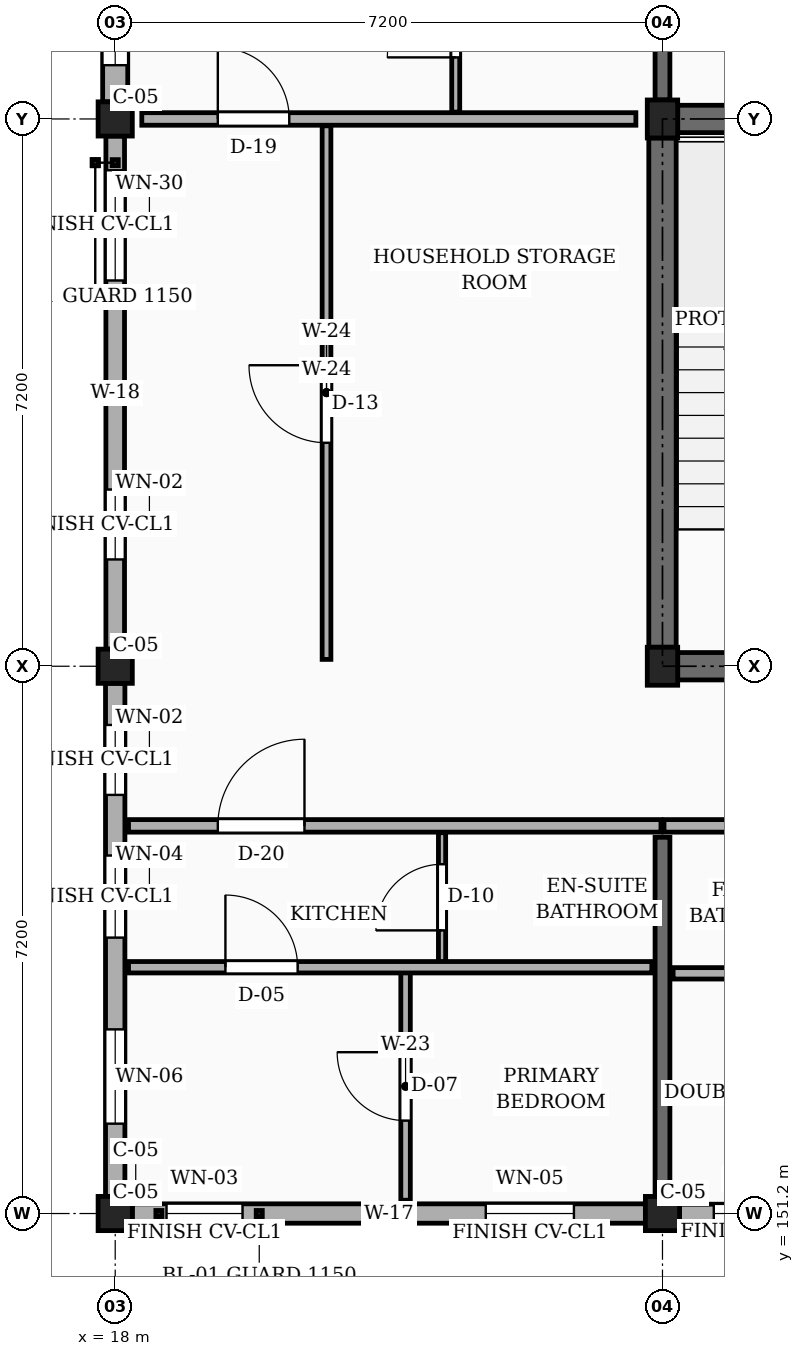
"""IFC4 building model, lengths in metres.
Left out: names, types, materials, properties, quantities, classifications, styles, units other than length and angle.
Written with IfcOpenShell. Run it as: python <this file> out.ifc"""

import sys

from ifc_helpers import new_model, si_unit, direction, frame, frame_2d, origin, origin_2d, place, context, subcontext, project, spatial, rectangle, extrude, element, fill, save


model = new_model("IFC4")
c1 = context("Model", 3, precision=1e-05, world=origin(), true_north=direction((0.0, 1.0)))
c2 = subcontext(c1, "Body", "Model", "MODEL_VIEW")
j1 = project(units=[si_unit("LENGTHUNIT", "METRE"), si_unit("PLANEANGLEUNIT", "RADIAN")], contexts=[c1])
p1 = place(None, origin())
s1 = spatial("IfcSite", under=j1, at=p1, CompositionType="ELEMENT")
p2 = place(p1, origin())
s2 = spatial("IfcBuilding", under=s1, at=p2, CompositionType="ELEMENT")
p3 = place(p2, frame((0.0, 0.0, 39.15)))
s3 = spatial("IfcBuildingStorey", under=s2, at=p3, CompositionType="ELEMENT", Elevation=39.15)
for number, where, z_axis, x_axis in (
    (1, (18.0, 151.2, 0.0), (0.0, 0.0, 1.0), (1.0, 0.0, 0.0)),
    (2, (18.0, 158.4, 0.0), (0.0, 0.0, 1.0), (1.0, 0.0, 0.0)),
    (3, (18.0, 165.6, 0.0), (0.0, 0.0, 1.0), (1.0, 0.0, 0.0)),
    (4, (25.2, 151.2, 0.0), (0.0, 0.0, 1.0), (1.0, 0.0, 0.0)),
):
    element("IfcColumn", number, at=place(p3, frame(where, z_axis=z_axis, x_axis=x_axis)), inside=s3, PredefinedType="COLUMN", context=c2, shape_type="SweptSolid", body=[
        extrude(rectangle(XDim=0.45, YDim=0.45, at=origin_2d()), origin(), (0.0, 0.0, 1.0), 3.15),
    ])
for number, where, z_axis, x_axis in (
    (5, (25.2, 158.4, 0.0), (0.0, 0.0, 1.0), (1.0, 0.0, 0.0)),
    (6, (25.2, 165.6, 0.0), (0.0, 0.0, 1.0), (1.0, 0.0, 0.0)),
):
    element("IfcColumn", number, at=place(p3, frame(where, z_axis=z_axis, x_axis=x_axis)), inside=s3, PredefinedType="COLUMN", context=c2, shape_type="SweptSolid", body=[
        extrude(rectangle(XDim=0.4, YDim=0.5, at=origin_2d()), origin(), (0.0, 0.0, 1.0), 3.15),
    ])
p4 = place(p3, frame((25.2, 151.425, 0.0), z_axis=(0.0, 0.0, 1.0), x_axis=(0.0, 1.0, 0.0)))
e7 = element("IfcWall", 7, at=p4, inside=s3, PredefinedType="SOLIDWALL", context=c2, shape_type="SweptSolid", body=[
    extrude(rectangle(XDim=4.725, YDim=0.195, at=frame_2d((2.362, 0.0))), origin(), (0.0, 0.0, 1.0), 2.185),
])
p5 = place(p3, frame((25.2, 165.85, 0.0), z_axis=(0.0, 0.0, 1.0), x_axis=(0.0, 1.0, 0.0)))
e8 = element("IfcWall", 8, at=p5, inside=s3, PredefinedType="SOLIDWALL", context=c2, shape_type="SweptSolid", body=[
    extrude(rectangle(XDim=6.725, YDim=0.195, at=frame_2d((3.362, 0.0))), origin(), (0.0, 0.0, 1.0), 2.185),
])
p6 = place(p5, frame((4.15, 0.0, 0.0)))
e9 = element("IfcOpeningElement", 9, at=p6, cuts=e8, PredefinedType="OPENING", context=c2, shape_type="SweptSolid", body=[
    extrude(rectangle(XDim=0.98, YDim=2.12, at=frame_2d((0.49, 1.06))), frame((0.0, 0.107, 0.0), z_axis=(0.0, -1.0, 0.0), x_axis=(1.0, 0.0, 0.0)), (0.0, 0.0, 1.0), 0.215),
])
p7 = place(p3, frame((18.225, 151.2, 0.0), z_axis=(0.0, 0.0, 1.0), x_axis=(1.0, 0.0, 0.0)))
e10 = element("IfcWall", 10, at=p7, inside=s3, PredefinedType="SOLIDWALL", context=c2, shape_type="SweptSolid", body=[
    extrude(rectangle(XDim=6.75, YDim=0.255, at=frame_2d((3.375, 0.0))), origin(), (0.0, 0.0, 1.0), 2.455),
])
p8 = place(p7, frame((0.45, 0.0, 0.78)))
e11 = element("IfcOpeningElement", 11, at=p8, cuts=e10, PredefinedType="OPENING", context=c2, shape_type="SweptSolid", body=[
    extrude(rectangle(XDim=1.0, YDim=1.15, at=frame_2d((0.5, 0.575))), frame((0.0, 0.137, 0.0), z_axis=(0.0, -1.0, 0.0), x_axis=(1.0, 0.0, 0.0)), (0.0, 0.0, 1.0), 0.275),
])
p9 = place(p7, frame((4.65, 0.0, 0.78)))
e12 = element("IfcOpeningElement", 12, at=p9, cuts=e10, PredefinedType="OPENING", context=c2, shape_type="SweptSolid", body=[
    extrude(rectangle(XDim=1.16, YDim=1.15, at=frame_2d((0.58, 0.575))), frame((0.0, 0.137, 0.0), z_axis=(0.0, -1.0, 0.0), x_axis=(1.0, 0.0, 0.0)), (0.0, 0.0, 1.0), 0.275),
])
p10 = place(p3, frame((25.425, 151.2, 0.0), z_axis=(0.0, 0.0, 1.0), x_axis=(1.0, 0.0, 0.0)))
e13 = element("IfcWall", 13, at=p10, inside=s3, PredefinedType="SOLIDWALL", context=c2, shape_type="SweptSolid", body=[
    extrude(rectangle(XDim=6.75, YDim=0.245, at=frame_2d((3.375, 0.0))), origin(), (0.0, 0.0, 1.0), 2.455),
])
p11 = place(p10, frame((0.45, 0.0, 0.78)))
e14 = element("IfcOpeningElement", 14, at=p11, cuts=e13, PredefinedType="OPENING", context=c2, shape_type="SweptSolid", body=[
    extrude(rectangle(XDim=1.16, YDim=1.15, at=frame_2d((0.58, 0.575))), frame((0.0, 0.133, 0.0), z_axis=(0.0, -1.0, 0.0), x_axis=(1.0, 0.0, 0.0)), (0.0, 0.0, 1.0), 0.265),
])
p12 = place(p10, frame((4.65, 0.0, 0.78)))
e15 = element("IfcOpeningElement", 15, at=p12, cuts=e13, PredefinedType="OPENING", context=c2, shape_type="SweptSolid", body=[
    extrude(rectangle(XDim=1.32, YDim=1.15, at=frame_2d((0.66, 0.575))), frame((0.0, 0.133, 0.0), z_axis=(0.0, -1.0, 0.0), x_axis=(1.0, 0.0, 0.0)), (0.0, 0.0, 1.0), 0.265),
])
p13 = place(p3, frame((18.0, 172.575, 0.0), z_axis=(0.0, 0.0, 1.0), x_axis=(0.0, -1.0, 0.0)))
e16 = element("IfcWall", 16, at=p13, inside=s3, PredefinedType="SOLIDWALL", context=c2, shape_type="SweptSolid", body=[
    extrude(rectangle(XDim=6.75, YDim=0.33, at=frame_2d((3.375, 0.0))), origin(), (0.0, 0.0, 1.0), 2.455),
])
p14 = place(p13, frame((1.683, 0.0, 0.78)))
e17 = element("IfcOpeningElement", 17, at=p14, cuts=e16, PredefinedType="OPENING", context=c2, shape_type="SweptSolid", body=[
    extrude(rectangle(XDim=1.25, YDim=1.44, at=frame_2d((0.625, 0.72))), frame((0.0, 0.175, 0.0), z_axis=(0.0, -1.0, 0.0), x_axis=(1.0, 0.0, 0.0)), (0.0, 0.0, 1.0), 0.35),
])
p15 = place(p13, frame((4.817, 0.0, 0.78)))
e18 = element("IfcOpeningElement", 18, at=p15, cuts=e16, PredefinedType="OPENING", context=c2, shape_type="SweptSolid", body=[
    extrude(rectangle(XDim=1.45, YDim=1.44, at=frame_2d((0.725, 0.72))), frame((0.0, 0.175, 0.0), z_axis=(0.0, -1.0, 0.0), x_axis=(1.0, 0.0, 0.0)), (0.0, 0.0, 1.0), 0.35),
])
p16 = place(p3, frame((18.0, 165.375, 0.0), z_axis=(0.0, 0.0, 1.0), x_axis=(0.0, -1.0, 0.0)))
e19 = element("IfcWall", 19, at=p16, inside=s3, PredefinedType="SOLIDWALL", context=c2, shape_type="SweptSolid", body=[
    extrude(rectangle(XDim=6.75, YDim=0.245, at=frame_2d((3.375, 0.0))), origin(), (0.0, 0.0, 1.0), 2.455),
])
p17 = place(p16, frame((0.45, 0.0, 0.78)))
e20 = element("IfcOpeningElement", 20, at=p17, cuts=e19, PredefinedType="OPENING", context=c2, shape_type="SweptSolid", body=[
    extrude(rectangle(XDim=1.45, YDim=1.44, at=frame_2d((0.725, 0.72))), frame((0.0, 0.133, 0.0), z_axis=(0.0, -1.0, 0.0), x_axis=(1.0, 0.0, 0.0)), (0.0, 0.0, 1.0), 0.265),
])
p18 = place(p16, frame((4.65, 0.0, 0.78)))
e21 = element("IfcOpeningElement", 21, at=p18, cuts=e19, PredefinedType="OPENING", context=c2, shape_type="SweptSolid", body=[
    extrude(rectangle(XDim=0.92, YDim=1.15, at=frame_2d((0.46, 0.575))), frame((0.0, 0.133, 0.0), z_axis=(0.0, -1.0, 0.0), x_axis=(1.0, 0.0, 0.0)), (0.0, 0.0, 1.0), 0.265),
])
p19 = place(p3, frame((18.0, 158.175, 0.0), z_axis=(0.0, 0.0, 1.0), x_axis=(0.0, -1.0, 0.0)))
e22 = element("IfcWall", 22, at=p19, inside=s3, PredefinedType="SOLIDWALL", context=c2, shape_type="SweptSolid", body=[
    extrude(rectangle(XDim=6.75, YDim=0.255, at=frame_2d((3.375, 0.0))), origin(), (0.0, 0.0, 1.0), 2.455),
])
p20 = place(p19, frame((0.548, 0.0, 0.78)))
e23 = element("IfcOpeningElement", 23, at=p20, cuts=e22, PredefinedType="OPENING", context=c2, shape_type="SweptSolid", body=[
    extrude(rectangle(XDim=0.92, YDim=1.15, at=frame_2d((0.46, 0.575))), frame((0.0, 0.137, 0.0), z_axis=(0.0, -1.0, 0.0), x_axis=(1.0, 0.0, 0.0)), (0.0, 0.0, 1.0), 0.275),
])
p21 = place(p19, frame((2.265, 0.0, 0.78)))
e24 = element("IfcOpeningElement", 24, at=p21, cuts=e22, PredefinedType="OPENING", context=c2, shape_type="SweptSolid", body=[
    extrude(rectangle(XDim=1.08, YDim=1.15, at=frame_2d((0.54, 0.575))), frame((0.0, 0.137, 0.0), z_axis=(0.0, -1.0, 0.0), x_axis=(1.0, 0.0, 0.0)), (0.0, 0.0, 1.0), 0.275),
])
p22 = place(p19, frame((4.552, 0.0, 0.78)))
e25 = element("IfcOpeningElement", 25, at=p22, cuts=e22, PredefinedType="OPENING", context=c2, shape_type="SweptSolid", body=[
    extrude(rectangle(XDim=1.24, YDim=1.15, at=frame_2d((0.62, 0.575))), frame((0.0, 0.137, 0.0), z_axis=(0.0, -1.0, 0.0), x_axis=(1.0, 0.0, 0.0)), (0.0, 0.0, 1.0), 0.275),
])
p23 = place(p3, frame((25.2, 158.65, 0.0), z_axis=(0.0, 0.0, 1.0), x_axis=(0.0, 1.0, 0.0)))
e26 = element("IfcWall", 26, at=p23, inside=s3, PredefinedType="SHEAR", context=c2, shape_type="SweptSolid", body=[
    extrude(rectangle(XDim=6.7, YDim=0.36, at=frame_2d((3.35, 0.0))), origin(), (0.0, 0.0, 1.0), 2.885),
])
p24 = place(p3, frame((25.4, 165.6, 0.0), z_axis=(0.0, 0.0, 1.0), x_axis=(1.0, 0.0, 0.0)))
e27 = element("IfcWall", 27, at=p24, inside=s3, PredefinedType="SHEAR", context=c2, shape_type="SweptSolid", body=[
    extrude(rectangle(XDim=6.8, YDim=0.36, at=frame_2d((3.4, 0.0))), origin(), (0.0, 0.0, 1.0), 2.885),
])
p25 = place(p3, frame((25.4, 158.4, 0.0), z_axis=(0.0, 0.0, 1.0), x_axis=(1.0, 0.0, 0.0)))
e28 = element("IfcWall", 28, at=p25, inside=s3, PredefinedType="SHEAR", context=c2, shape_type="SweptSolid", body=[
    extrude(rectangle(XDim=6.8, YDim=0.36, at=frame_2d((3.4, 0.0))), origin(), (0.0, 0.0, 1.0), 2.885),
])
p26 = place(p25, frame((4.55, 0.0, 0.0)))
e29 = element("IfcOpeningElement", 29, at=p26, cuts=e28, PredefinedType="OPENING", context=c2, shape_type="SweptSolid", body=[
    extrude(rectangle(XDim=1.1, YDim=2.15, at=frame_2d((0.55, 1.075))), frame((0.0, 0.19, 0.0), z_axis=(0.0, -1.0, 0.0), x_axis=(1.0, 0.0, 0.0)), (0.0, 0.0, 1.0), 0.38),
])
p27 = place(p3, frame((18.175, 156.3, 0.0), z_axis=(0.0, 0.0, 1.0), x_axis=(1.0, 0.0, 0.0)))
e30 = element("IfcWall", 30, at=p27, inside=s3, PredefinedType="PARTITIONING", context=c2, shape_type="SweptSolid", body=[
    extrude(rectangle(XDim=7.005, YDim=0.165, at=frame_2d((3.502, 0.0))), origin(), (0.0, 0.0, 1.0), 2.32),
])
p28 = place(p27, frame((1.175, 0.0, 0.0)))
e31 = element("IfcOpeningElement", 31, at=p28, cuts=e30, PredefinedType="OPENING", context=c2, shape_type="SweptSolid", body=[
    extrude(rectangle(XDim=1.14, YDim=2.18, at=frame_2d((0.57, 1.09))), frame((0.0, 0.093, 0.0), z_axis=(0.0, -1.0, 0.0), x_axis=(1.0, 0.0, 0.0)), (0.0, 0.0, 1.0), 0.185),
])
p29 = place(p3, frame((25.22, 156.3, 0.0), z_axis=(0.0, 0.0, 1.0), x_axis=(1.0, 0.0, 0.0)))
e32 = element("IfcWall", 32, at=p29, inside=s3, PredefinedType="PARTITIONING", context=c2, shape_type="SweptSolid", body=[
    extrude(rectangle(XDim=7.16, YDim=0.165, at=frame_2d((3.58, 0.0))), origin(), (0.0, 0.0, 1.0), 2.32),
])
p30 = place(p29, frame((4.78, 0.0, 0.0)))
e33 = element("IfcOpeningElement", 33, at=p30, cuts=e32, PredefinedType="OPENING", context=c2, shape_type="SweptSolid", body=[
    extrude(rectangle(XDim=1.0, YDim=2.15, at=frame_2d((0.5, 1.075))), frame((0.0, 0.093, 0.0), z_axis=(0.0, -1.0, 0.0), x_axis=(1.0, 0.0, 0.0)), (0.0, 0.0, 1.0), 0.185),
])
p31 = place(p3, frame((18.35, 165.6, 0.0), z_axis=(0.0, 0.0, 1.0), x_axis=(1.0, 0.0, 0.0)))
e34 = element("IfcWall", 34, at=p31, inside=s3, PredefinedType="PARTITIONING", context=c2, shape_type="SweptSolid", body=[
    extrude(rectangle(XDim=6.5, YDim=0.165, at=frame_2d((3.25, 0.0))), origin(), (0.0, 0.0, 1.0), 2.32),
])
p32 = place(p31, frame((1.0, 0.0, 0.0)))
e35 = element("IfcOpeningElement", 35, at=p32, cuts=e34, PredefinedType="OPENING", context=c2, shape_type="SweptSolid", body=[
    extrude(rectangle(XDim=0.94, YDim=2.12, at=frame_2d((0.47, 1.06))), frame((0.0, 0.093, 0.0), z_axis=(0.0, -1.0, 0.0), x_axis=(1.0, 0.0, 0.0)), (0.0, 0.0, 1.0), 0.185),
])
p33 = place(p3, frame((20.78, 158.49, 0.0), z_axis=(0.0, 0.0, 1.0), x_axis=(0.0, 1.0, 0.0)))
e36 = element("IfcWall", 36, at=p33, inside=s3, PredefinedType="PARTITIONING", context=c2, shape_type="SweptSolid", body=[
    extrude(rectangle(XDim=7.02, YDim=0.115, at=frame_2d((3.51, 0.0))), origin(), (0.0, 0.0, 1.0), 2.32),
])
p34 = place(p33, frame((2.85, 0.0, 0.0)))
e37 = element("IfcOpeningElement", 37, at=p34, cuts=e36, PredefinedType="OPENING", context=c2, shape_type="SweptSolid", body=[
    extrude(rectangle(XDim=1.02, YDim=2.15, at=frame_2d((0.51, 1.075))), frame((0.0, 0.067, 0.0), z_axis=(0.0, -1.0, 0.0), x_axis=(1.0, 0.0, 0.0)), (0.0, 0.0, 1.0), 0.135),
])
p35 = place(p3, frame((21.82, 151.375, 0.0), z_axis=(0.0, 0.0, 1.0), x_axis=(0.0, 1.0, 0.0)))
e38 = element("IfcWall", 38, at=p35, inside=s3, PredefinedType="PARTITIONING", context=c2, shape_type="SweptSolid", body=[
    extrude(rectangle(XDim=2.995, YDim=0.125, at=frame_2d((1.498, 0.0))), origin(), (0.0, 0.0, 1.0), 2.32),
])
p36 = place(p35, frame((1.048, 0.0, 0.0)))
e39 = element("IfcOpeningElement", 39, at=p36, cuts=e38, PredefinedType="OPENING", context=c2, shape_type="SweptSolid", body=[
    extrude(rectangle(XDim=0.9, YDim=2.1, at=frame_2d((0.45, 1.05))), frame((0.0, 0.073, 0.0), z_axis=(0.0, -1.0, 0.0), x_axis=(1.0, 0.0, 0.0)), (0.0, 0.0, 1.0), 0.145),
])
p37 = place(p3, frame((22.3, 154.51, 0.0), z_axis=(0.0, 0.0, 1.0), x_axis=(0.0, 1.0, 0.0)))
e40 = element("IfcWall", 40, at=p37, inside=s3, PredefinedType="PARTITIONING", context=c2, shape_type="SweptSolid", body=[
    extrude(rectangle(XDim=1.7, YDim=0.095, at=frame_2d((0.85, 0.0))), origin(), (0.0, 0.0, 1.0), 2.32),
])
p38 = place(p37, frame((0.415, 0.0, 0.0)))
e41 = element("IfcOpeningElement", 41, at=p38, cuts=e40, PredefinedType="OPENING", context=c2, shape_type="SweptSolid", body=[
    extrude(rectangle(XDim=0.87, YDim=2.05, at=frame_2d((0.435, 1.025))), frame((0.0, 0.058, 0.0), z_axis=(0.0, -1.0, 0.0), x_axis=(1.0, 0.0, 0.0)), (0.0, 0.0, 1.0), 0.115),
])
p39 = place(p3, frame((18.175, 154.44, 0.0), z_axis=(0.0, 0.0, 1.0), x_axis=(1.0, 0.0, 0.0)))
e42 = element("IfcWall", 42, at=p39, inside=s3, PredefinedType="PARTITIONING", context=c2, shape_type="SweptSolid", body=[
    extrude(rectangle(XDim=6.885, YDim=0.15, at=frame_2d((3.442, 0.0))), origin(), (0.0, 0.0, 1.0), 2.32),
])
p40 = place(p39, frame((1.275, 0.0, 0.0)))
e43 = element("IfcOpeningElement", 43, at=p40, cuts=e42, PredefinedType="OPENING", context=c2, shape_type="SweptSolid", body=[
    extrude(rectangle(XDim=0.95, YDim=2.1, at=frame_2d((0.475, 1.05))), frame((0.0, 0.085, 0.0), z_axis=(0.0, -1.0, 0.0), x_axis=(1.0, 0.0, 0.0)), (0.0, 0.0, 1.0), 0.17),
])
p41 = place(p3, frame((22.48, 165.69, 0.0), z_axis=(0.0, 0.0, 1.0), x_axis=(0.0, 1.0, 0.0)))
e44 = element("IfcWall", 44, at=p41, inside=s3, PredefinedType="PARTITIONING", context=c2, shape_type="SweptSolid", body=[
    extrude(rectangle(XDim=2.34, YDim=0.105, at=frame_2d((1.17, 0.0))), origin(), (0.0, 0.0, 1.0), 2.32),
])
p42 = place(p41, frame((0.72, 0.0, 0.0)))
e45 = element("IfcOpeningElement", 45, at=p42, cuts=e44, PredefinedType="OPENING", context=c2, shape_type="SweptSolid", body=[
    extrude(rectangle(XDim=0.9, YDim=2.05, at=frame_2d((0.45, 1.025))), frame((0.0, 0.062, 0.0), z_axis=(0.0, -1.0, 0.0), x_axis=(1.0, 0.0, 0.0)), (0.0, 0.0, 1.0), 0.125),
])
p43 = place(p3, frame((25.34, 154.36, 0.0), z_axis=(0.0, 0.0, 1.0), x_axis=(1.0, 0.0, 0.0)))
e46 = element("IfcWall", 46, at=p43, inside=s3, PredefinedType="PARTITIONING", context=c2, shape_type="SweptSolid", body=[
    extrude(rectangle(XDim=6.92, YDim=0.15, at=frame_2d((3.46, 0.0))), origin(), (0.0, 0.0, 1.0), 2.32),
])
p44 = place(p43, frame((4.66, 0.0, 0.0)))
e47 = element("IfcOpeningElement", 47, at=p44, cuts=e46, PredefinedType="OPENING", context=c2, shape_type="SweptSolid", body=[
    extrude(rectangle(XDim=0.92, YDim=2.1, at=frame_2d((0.46, 1.05))), frame((0.0, 0.085, 0.0), z_axis=(0.0, -1.0, 0.0), x_axis=(1.0, 0.0, 0.0)), (0.0, 0.0, 1.0), 0.17),
])
p45 = place(p8, origin())
e48 = element("IfcWindow", 48, at=p45, inside=s3, PartitioningType="SINGLE_PANEL", PredefinedType="WINDOW", context=c2, shape_type="SweptSolid", body=[
    extrude(rectangle(XDim=1.0, YDim=1.15, at=frame_2d((0.5, 0.575))), frame((0.0, 0.03, 0.0), z_axis=(0.0, -1.0, 0.0), x_axis=(1.0, 0.0, 0.0)), (0.0, 0.0, 1.0), 0.06),
])
fill(e11, e48)
p46 = place(p9, origin())
e49 = element("IfcWindow", 49, at=p46, inside=s3, PartitioningType="SINGLE_PANEL", PredefinedType="WINDOW", context=c2, shape_type="SweptSolid", body=[
    extrude(rectangle(XDim=1.16, YDim=1.15, at=frame_2d((0.58, 0.575))), frame((0.0, 0.03, 0.0), z_axis=(0.0, -1.0, 0.0), x_axis=(1.0, 0.0, 0.0)), (0.0, 0.0, 1.0), 0.06),
])
fill(e12, e49)
p47 = place(p11, origin())
e50 = element("IfcWindow", 50, at=p47, inside=s3, PartitioningType="SINGLE_PANEL", PredefinedType="WINDOW", context=c2, shape_type="SweptSolid", body=[
    extrude(rectangle(XDim=1.16, YDim=1.15, at=frame_2d((0.58, 0.575))), frame((0.0, 0.03, 0.0), z_axis=(0.0, -1.0, 0.0), x_axis=(1.0, 0.0, 0.0)), (0.0, 0.0, 1.0), 0.06),
])
fill(e14, e50)
p48 = place(p15, origin())
e51 = element("IfcWindow", 51, at=p48, inside=s3, PartitioningType="SINGLE_PANEL", PredefinedType="WINDOW", context=c2, shape_type="SweptSolid", body=[
    extrude(rectangle(XDim=1.45, YDim=1.44, at=frame_2d((0.725, 0.72))), frame((0.0, 0.03, 0.0), z_axis=(0.0, -1.0, 0.0), x_axis=(1.0, 0.0, 0.0)), (0.0, 0.0, 1.0), 0.06),
])
fill(e18, e51)
p49 = place(p17, origin())
e52 = element("IfcWindow", 52, at=p49, inside=s3, PartitioningType="SINGLE_PANEL", PredefinedType="WINDOW", context=c2, shape_type="SweptSolid", body=[
    extrude(rectangle(XDim=1.45, YDim=1.44, at=frame_2d((0.725, 0.72))), frame((0.0, 0.03, 0.0), z_axis=(0.0, -1.0, 0.0), x_axis=(1.0, 0.0, 0.0)), (0.0, 0.0, 1.0), 0.06),
])
fill(e20, e52)
p50 = place(p18, origin())
e53 = element("IfcWindow", 53, at=p50, inside=s3, PartitioningType="SINGLE_PANEL", PredefinedType="WINDOW", context=c2, shape_type="SweptSolid", body=[
    extrude(rectangle(XDim=0.92, YDim=1.15, at=frame_2d((0.46, 0.575))), frame((0.0, 0.03, 0.0), z_axis=(0.0, -1.0, 0.0), x_axis=(1.0, 0.0, 0.0)), (0.0, 0.0, 1.0), 0.06),
])
fill(e21, e53)
p51 = place(p20, origin())
e54 = element("IfcWindow", 54, at=p51, inside=s3, PartitioningType="SINGLE_PANEL", PredefinedType="WINDOW", context=c2, shape_type="SweptSolid", body=[
    extrude(rectangle(XDim=0.92, YDim=1.15, at=frame_2d((0.46, 0.575))), frame((0.0, 0.03, 0.0), z_axis=(0.0, -1.0, 0.0), x_axis=(1.0, 0.0, 0.0)), (0.0, 0.0, 1.0), 0.06),
])
fill(e23, e54)
p52 = place(p21, origin())
e55 = element("IfcWindow", 55, at=p52, inside=s3, PartitioningType="SINGLE_PANEL", PredefinedType="WINDOW", context=c2, shape_type="SweptSolid", body=[
    extrude(rectangle(XDim=1.08, YDim=1.15, at=frame_2d((0.54, 0.575))), frame((0.0, 0.03, 0.0), z_axis=(0.0, -1.0, 0.0), x_axis=(1.0, 0.0, 0.0)), (0.0, 0.0, 1.0), 0.06),
])
fill(e24, e55)
p53 = place(p22, origin())
e56 = element("IfcWindow", 56, at=p53, inside=s3, PartitioningType="SINGLE_PANEL", PredefinedType="WINDOW", context=c2, shape_type="SweptSolid", body=[
    extrude(rectangle(XDim=1.24, YDim=1.15, at=frame_2d((0.62, 0.575))), frame((0.0, 0.03, 0.0), z_axis=(0.0, -1.0, 0.0), x_axis=(1.0, 0.0, 0.0)), (0.0, 0.0, 1.0), 0.06),
])
fill(e25, e56)
p54 = place(p28, origin())
e57 = element("IfcDoor", 57, at=p54, inside=s3, OperationType="SINGLE_SWING_RIGHT", PredefinedType="DOOR", context=c2, shape_type="SweptSolid", body=[
    extrude(rectangle(XDim=1.14, YDim=2.18, at=frame_2d((0.57, 1.09))), frame((0.0, 0.025, 0.0), z_axis=(0.0, -1.0, 0.0), x_axis=(1.0, 0.0, 0.0)), (0.0, 0.0, 1.0), 0.05),
])
fill(e31, e57)
p55 = place(p32, origin())
e58 = element("IfcDoor", 58, at=p55, inside=s3, OperationType="SINGLE_SWING_LEFT", PredefinedType="DOOR", context=c2, shape_type="SweptSolid", body=[
    extrude(rectangle(XDim=0.94, YDim=2.12, at=frame_2d((0.47, 1.06))), frame((0.0, 0.025, 0.0), z_axis=(0.0, -1.0, 0.0), x_axis=(1.0, 0.0, 0.0)), (0.0, 0.0, 1.0), 0.05),
])
fill(e35, e58)
p56 = place(p34, origin())
e59 = element("IfcDoor", 59, at=p56, inside=s3, OperationType="SINGLE_SWING_RIGHT", PredefinedType="DOOR", context=c2, shape_type="SweptSolid", body=[
    extrude(rectangle(XDim=1.02, YDim=2.15, at=frame_2d((0.51, 1.075))), frame((0.0, 0.025, 0.0), z_axis=(0.0, -1.0, 0.0), x_axis=(1.0, 0.0, 0.0)), (0.0, 0.0, 1.0), 0.05),
])
fill(e37, e59)
p57 = place(p36, origin())
e60 = element("IfcDoor", 60, at=p57, inside=s3, OperationType="SINGLE_SWING_RIGHT", PredefinedType="DOOR", context=c2, shape_type="SweptSolid", body=[
    extrude(rectangle(XDim=0.9, YDim=2.1, at=frame_2d((0.45, 1.05))), frame((0.0, 0.025, 0.0), z_axis=(0.0, -1.0, 0.0), x_axis=(1.0, 0.0, 0.0)), (0.0, 0.0, 1.0), 0.05),
])
fill(e39, e60)
p58 = place(p38, origin())
e61 = element("IfcDoor", 61, at=p58, inside=s3, OperationType="SINGLE_SWING_LEFT", PredefinedType="DOOR", context=c2, shape_type="SweptSolid", body=[
    extrude(rectangle(XDim=0.87, YDim=2.05, at=frame_2d((0.435, 1.025))), frame((0.0, 0.025, 0.0), z_axis=(0.0, -1.0, 0.0), x_axis=(1.0, 0.0, 0.0)), (0.0, 0.0, 1.0), 0.05),
])
fill(e41, e61)
p59 = place(p40, origin())
e62 = element("IfcDoor", 62, at=p59, inside=s3, OperationType="SINGLE_SWING_LEFT", PredefinedType="DOOR", context=c2, shape_type="SweptSolid", body=[
    extrude(rectangle(XDim=0.95, YDim=2.1, at=frame_2d((0.475, 1.05))), frame((0.0, 0.025, 0.0), z_axis=(0.0, -1.0, 0.0), x_axis=(1.0, 0.0, 0.0)), (0.0, 0.0, 1.0), 0.05),
])
fill(e43, e62)
p60 = place(p42, origin())
e63 = element("IfcDoor", 63, at=p60, inside=s3, OperationType="SINGLE_SWING_LEFT", PredefinedType="DOOR", context=c2, shape_type="SweptSolid", body=[
    extrude(rectangle(XDim=0.9, YDim=2.05, at=frame_2d((0.45, 1.025))), frame((0.0, 0.025, 0.0), z_axis=(0.0, -1.0, 0.0), x_axis=(1.0, 0.0, 0.0)), (0.0, 0.0, 1.0), 0.05),
])
fill(e45, e63)
save(model, sys.argv[1])
